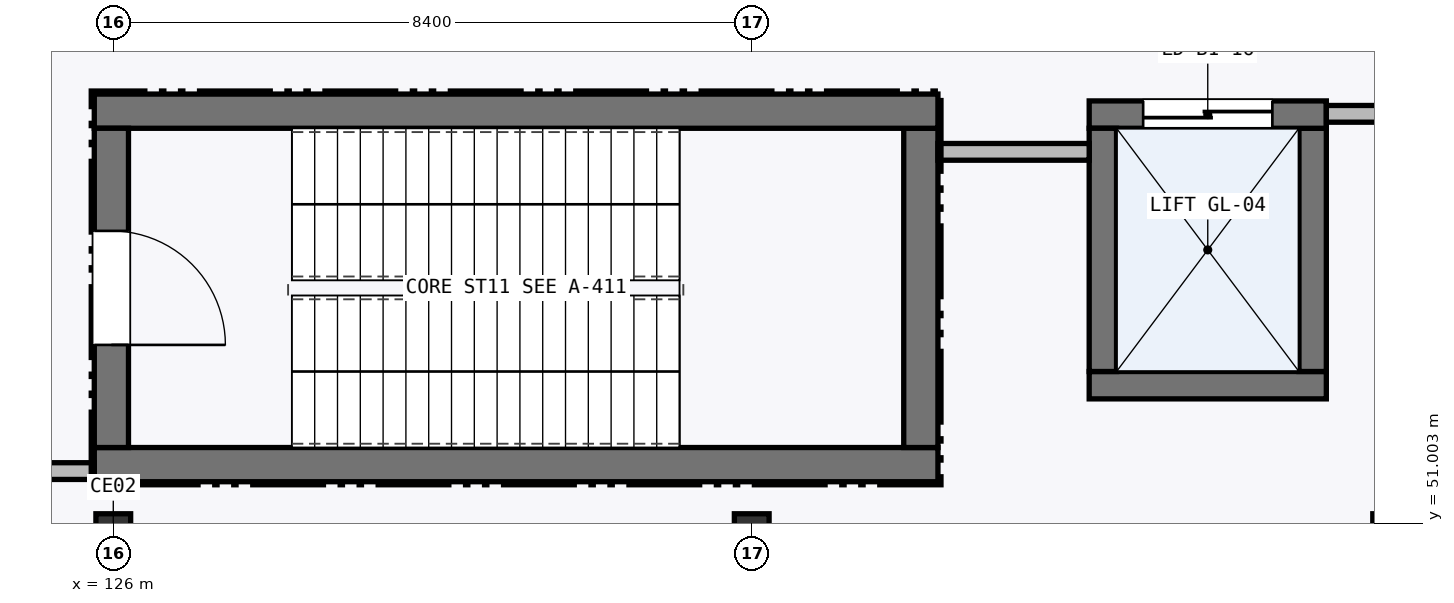
"""IFC4 building model, lengths in metres.
Left out: names, types, materials, properties, quantities, classifications, styles, units other than length and angle.
Written with IfcOpenShell. Run it as: python <this file> out.ifc"""

import sys

from ifc_helpers import new_model, si_unit, direction, frame, frame_2d, origin, origin_2d, place, context, subcontext, project, spatial, rectangle, hollow_circle, extrude, element, fill, save


model = new_model("IFC4")
c1 = context("Model", 3, precision=1e-05, world=origin(), true_north=direction((0.0, 1.0)))
c2 = subcontext(c1, "Body", "Model", "MODEL_VIEW")
j1 = project(units=[si_unit("LENGTHUNIT", "METRE"), si_unit("PLANEANGLEUNIT", "RADIAN")], contexts=[c1])
p1 = place(None, origin())
s1 = spatial("IfcSite", under=j1, at=p1, CompositionType="ELEMENT")
p2 = place(p1, origin())
s2 = spatial("IfcBuilding", under=s1, at=p2, CompositionType="ELEMENT")
p3 = place(p2, frame((0.0, 0.0, -5.4)))
s3 = spatial("IfcBuildingStorey", under=s2, at=p3, CompositionType="ELEMENT", Elevation=-5.4)
for number, where, z_axis, x_axis in (
    (1, (126.0, 50.9, 0.0), (0.0, 0.0, 1.0), (1.0, 0.0, 0.0)),
    (2, (134.4, 50.9, 0.0), (0.0, 0.0, 1.0), (1.0, 0.0, 0.0)),
    (3, (142.8, 50.9, 0.0), (0.0, 0.0, 1.0), (1.0, 0.0, 0.0)),
):
    element("IfcColumn", number, at=place(p3, frame(where, z_axis=z_axis, x_axis=x_axis)), inside=s3, PredefinedType="COLUMN", context=c2, shape_type="SweptSolid", body=[
        extrude(hollow_circle(Radius=0.229, WallThickness=0.016, at=origin_2d()), origin(), (0.0, 0.0, 1.0), 5.4),
    ])
p4 = place(p3, frame((125.75, 51.775, 0.0), z_axis=(0.0, 0.0, 1.0), x_axis=(1.0, 0.0, 0.0)))
e4 = element("IfcWall", 4, at=p4, inside=s3, PredefinedType="SHEAR", context=c2, shape_type="SweptSolid", body=[
    extrude(rectangle(XDim=11.1, YDim=0.45, at=frame_2d((5.55, 0.0))), origin(), (0.0, 0.0, 1.0), 5.145),
])
p5 = place(p3, frame((136.625, 52.0, 0.0), z_axis=(0.0, 0.0, 1.0), x_axis=(0.0, 1.0, 0.0)))
e5 = element("IfcWall", 5, at=p5, inside=s3, PredefinedType="SHEAR", context=c2, shape_type="SweptSolid", body=[
    extrude(rectangle(XDim=4.2, YDim=0.45, at=frame_2d((2.1, 0.0))), origin(), (0.0, 0.0, 1.0), 5.145),
])
p6 = place(p3, frame((136.85, 56.425, 0.0), z_axis=(0.0, 0.0, 1.0), x_axis=(-1.0, 0.0, 0.0)))
e6 = element("IfcWall", 6, at=p6, inside=s3, PredefinedType="SHEAR", context=c2, shape_type="SweptSolid", body=[
    extrude(rectangle(XDim=11.1, YDim=0.45, at=frame_2d((5.55, 0.0))), origin(), (0.0, 0.0, 1.0), 5.145),
])
p7 = place(p3, frame((125.975, 56.2, 0.0), z_axis=(0.0, 0.0, 1.0), x_axis=(0.0, -1.0, 0.0)))
e7 = element("IfcWall", 7, at=p7, inside=s3, PredefinedType="SHEAR", context=c2, shape_type="SweptSolid", body=[
    extrude(rectangle(XDim=4.2, YDim=0.45, at=frame_2d((2.1, 0.0))), origin(), (0.0, 0.0, 1.0), 5.145),
])
p8 = place(p7, frame((1.35, 0.0, 0.0)))
e8 = element("IfcOpeningElement", 8, at=p8, cuts=e7, PredefinedType="OPENING", context=c2, shape_type="SweptSolid", body=[
    extrude(rectangle(XDim=1.5, YDim=2.15, at=frame_2d((0.75, 1.075))), frame((0.0, 0.235, 0.0), z_axis=(0.0, -1.0, 0.0), x_axis=(1.0, 0.0, 0.0)), (0.0, 0.0, 1.0), 0.47),
])
p9 = place(p3, frame((138.84, 52.82, 0.0), z_axis=(0.0, 0.0, 1.0), x_axis=(1.0, 0.0, 0.0)))
e9 = element("IfcWall", 9, at=p9, inside=s3, PredefinedType="SHEAR", context=c2, shape_type="SweptSolid", body=[
    extrude(rectangle(XDim=3.12, YDim=0.36, at=frame_2d((1.56, 0.0))), origin(), (0.0, 0.0, 1.0), 5.145),
])
p10 = place(p3, frame((141.78, 53.0, 0.0), z_axis=(0.0, 0.0, 1.0), x_axis=(0.0, 1.0, 0.0)))
e10 = element("IfcWall", 10, at=p10, inside=s3, PredefinedType="SHEAR", context=c2, shape_type="SweptSolid", body=[
    extrude(rectangle(XDim=3.2, YDim=0.36, at=frame_2d((1.6, 0.0))), origin(), (0.0, 0.0, 1.0), 5.145),
])
p11 = place(p3, frame((141.96, 56.38, 0.0), z_axis=(0.0, 0.0, 1.0), x_axis=(-1.0, 0.0, 0.0)))
e11 = element("IfcWall", 11, at=p11, inside=s3, PredefinedType="SHEAR", context=c2, shape_type="SweptSolid", body=[
    extrude(rectangle(XDim=3.12, YDim=0.36, at=frame_2d((1.56, 0.0))), origin(), (0.0, 0.0, 1.0), 5.145),
])
p12 = place(p11, frame((0.71, 0.0, 0.0)))
e12 = element("IfcOpeningElement", 12, at=p12, cuts=e11, PredefinedType="OPENING", context=c2, shape_type="SweptSolid", body=[
    extrude(rectangle(XDim=1.7, YDim=2.3, at=frame_2d((0.85, 1.15))), frame((0.0, 0.19, 0.0), z_axis=(0.0, -1.0, 0.0), x_axis=(1.0, 0.0, 0.0)), (0.0, 0.0, 1.0), 0.38),
])
p13 = place(p3, frame((139.02, 56.2, 0.0), z_axis=(0.0, 0.0, 1.0), x_axis=(0.0, -1.0, 0.0)))
e13 = element("IfcWall", 13, at=p13, inside=s3, PredefinedType="SHEAR", context=c2, shape_type="SweptSolid", body=[
    extrude(rectangle(XDim=3.2, YDim=0.36, at=frame_2d((1.6, 0.0))), origin(), (0.0, 0.0, 1.0), 5.145),
])
p14 = place(p3, frame((143.0, 56.39, 0.0), z_axis=(0.0, 0.0, 1.0), x_axis=(-1.0, 0.0, 0.0)))
e14 = element("IfcWall", 14, at=p14, inside=s3, PredefinedType="PARTITIONING", context=c2, shape_type="SweptSolid", body=[
    extrude(rectangle(XDim=1.04, YDim=0.22, at=frame_2d((0.52, 0.0))), origin(), (0.0, 0.0, 1.0), 5.145),
])
p15 = place(p3, frame((138.84, 55.89, 0.0), z_axis=(0.0, 0.0, 1.0), x_axis=(-1.0, 0.0, 0.0)))
e15 = element("IfcWall", 15, at=p15, inside=s3, PredefinedType="PARTITIONING", context=c2, shape_type="SweptSolid", body=[
    extrude(rectangle(XDim=1.99, YDim=0.22, at=frame_2d((0.995, 0.0))), origin(), (0.0, 0.0, 1.0), 5.145),
])
p16 = place(p3, frame((125.75, 51.69, 0.0), z_axis=(0.0, 0.0, 1.0), x_axis=(-1.0, 0.0, 0.0)))
e16 = element("IfcWall", 16, at=p16, inside=s3, PredefinedType="PARTITIONING", context=c2, shape_type="SweptSolid", body=[
    extrude(rectangle(XDim=2.75, YDim=0.22, at=frame_2d((1.375, 0.0))), origin(), (0.0, 0.0, 1.0), 5.145),
])
p17 = place(p8, origin())
e17 = element("IfcDoor", 17, at=p17, inside=s3, OperationType="SINGLE_SWING_RIGHT", PredefinedType="DOOR", context=c2, shape_type="SweptSolid", body=[
    extrude(rectangle(XDim=1.5, YDim=2.15, at=frame_2d((0.75, 1.075))), frame((0.0, 0.025, 0.0), z_axis=(0.0, -1.0, 0.0), x_axis=(1.0, 0.0, 0.0)), (0.0, 0.0, 1.0), 0.05),
])
fill(e8, e17)
p18 = place(p12, frame((1.7, 0.0, 0.0), z_axis=(0.0, 0.0, 1.0), x_axis=(-1.0, 0.0, 0.0)))
e18 = element("IfcDoor", 18, at=p18, inside=s3, OperationType="DOUBLE_DOOR_SLIDING", PredefinedType="DOOR", context=c2, shape_type="SweptSolid", body=[
    extrude(rectangle(XDim=1.7, YDim=2.3, at=frame_2d((0.85, 1.15))), frame((0.0, 0.025, 0.0), z_axis=(0.0, -1.0, 0.0), x_axis=(1.0, 0.0, 0.0)), (0.0, 0.0, 1.0), 0.05),
])
fill(e12, e18)
save(model, sys.argv[1])
